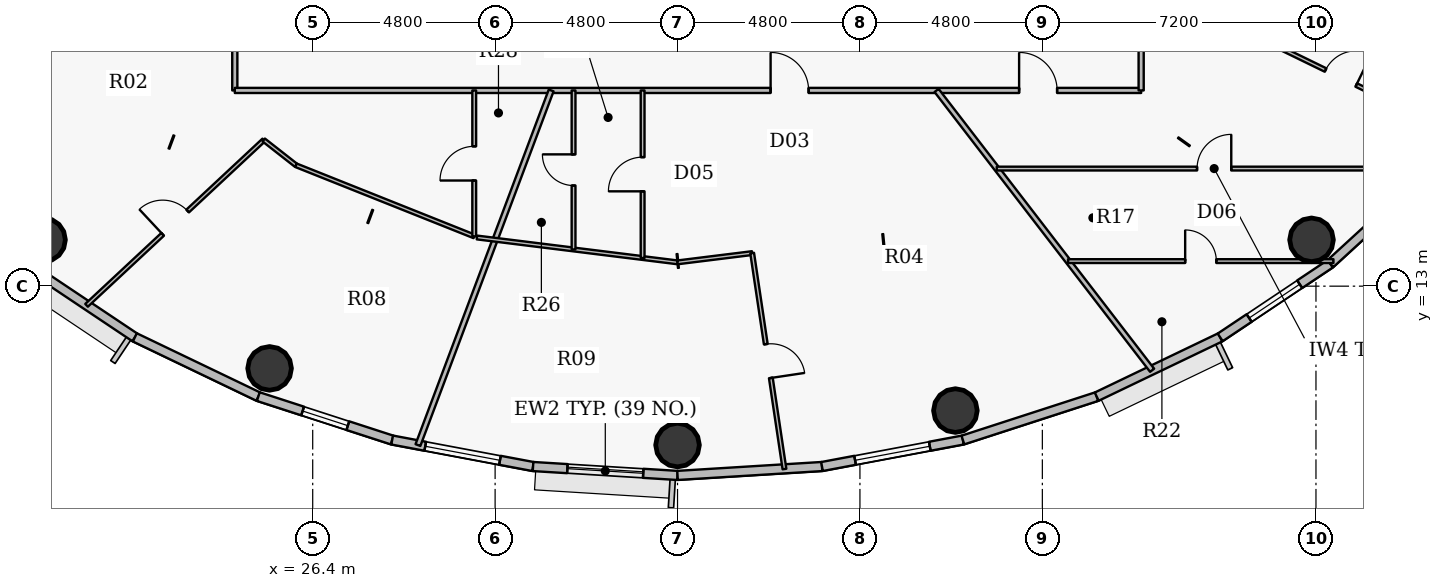
"""IFC4 building model, lengths in metres.
Left out: names, types, materials, properties, quantities, classifications, styles, units other than length and angle.
Written with IfcOpenShell. Run it as: python <this file> out.ifc"""

import sys

from ifc_helpers import new_model, si_unit, direction, frame, frame_2d, origin, origin_2d, place, context, subcontext, project, spatial, rectangle, hollow_circle, extrude, source, transform, mapped, element, fill, save


model = new_model("IFC4")
c1 = context("Model", 3, precision=1e-05, world=origin(), true_north=direction((0.0, 1.0)))
c2 = subcontext(c1, "Body", "Model", "MODEL_VIEW")
j1 = project(units=[si_unit("LENGTHUNIT", "METRE"), si_unit("PLANEANGLEUNIT", "RADIAN")], contexts=[c1])
p1 = place(None, origin())
s1 = spatial("IfcSite", under=j1, at=p1, CompositionType="ELEMENT")
p2 = place(p1, origin())
s2 = spatial("IfcBuilding", under=s1, at=p2, CompositionType="ELEMENT")
p3 = place(p2, frame((0.0, 0.0, 229.05)))
s3 = spatial("IfcBuildingStorey", under=s2, at=p3, CompositionType="ELEMENT", Elevation=229.05)
for number, where, z_axis, x_axis in (
    (1, (19.317, 14.219, 0.0), (0.0, 0.0, 1.0), (1.0, 0.0, 0.0)),
    (2, (25.265, 10.836, 0.0), (0.0, 0.0, 1.0), (1.0, 0.0, 0.0)),
    (3, (36.0, 8.82, 0.0), (0.0, 0.0, 1.0), (1.0, 0.0, 0.0)),
    (4, (43.312, 9.727, 0.0), (0.0, 0.0, 1.0), (1.0, 0.0, 0.0)),
    (5, (52.683, 14.219, 0.0), (0.0, 0.0, 1.0), (1.0, 0.0, 0.0)),
):
    element("IfcColumn", number, at=place(p3, frame(where, z_axis=z_axis, x_axis=x_axis)), inside=s3, PredefinedType="COLUMN", context=c2, shape_type="SweptSolid", body=[
        extrude(hollow_circle(Radius=0.575, WallThickness=0.036, at=origin_2d()), origin(), (0.0, 0.0, 1.0), 3.75),
    ])
p4 = place(p3, frame((21.72, 11.652, 0.0), z_axis=(0.0, 0.0, 1.0), x_axis=(-0.831262496074, 0.555880079352, 0.0)))
e6 = element("IfcWall", 6, at=p4, inside=s3, PredefinedType="SOLIDWALL", context=c2, shape_type="SweptSolid", body=[
    extrude(rectangle(XDim=3.484, YDim=0.24, at=frame_2d((1.742, 0.0))), origin(), (0.0, 0.0, 1.0), 3.5),
])
p5 = place(p3, frame((24.969, 10.094, 0.0), z_axis=(0.0, 0.0, 1.0), x_axis=(-0.901598104751, 0.432574684313, 0.0)))
e7 = element("IfcWall", 7, at=p5, inside=s3, PredefinedType="SOLIDWALL", context=c2, shape_type="SweptSolid", body=[
    extrude(rectangle(XDim=3.604, YDim=0.24, at=frame_2d((1.802, 0.0))), origin(), (0.0, 0.0, 1.0), 3.5),
])
p6 = place(p3, frame((28.491, 8.951, 0.0), z_axis=(0.0, 0.0, 1.0), x_axis=(-0.951210789182, 0.308541787354, 0.0)))
e8 = element("IfcWall", 8, at=p6, inside=s3, PredefinedType="SOLIDWALL", context=c2, shape_type="SweptSolid", body=[
    extrude(rectangle(XDim=3.702, YDim=0.24, at=frame_2d((1.851, 0.0))), origin(), (0.0, 0.0, 1.0), 3.5),
])
p7 = place(p6, frame((1.226, 0.0, 0.9)))
e9 = element("IfcOpeningElement", 9, at=p7, cuts=e8, PredefinedType="OPENING", context=c2, shape_type="SweptSolid", body=[
    extrude(rectangle(XDim=1.25, YDim=1.65, at=origin_2d()), frame((0.625, 0.13, 0.825), z_axis=(0.0, -1.0, 0.0), x_axis=(1.0, 0.0, 0.0)), (0.0, 0.0, 1.0), 0.26),
])
p8 = place(p3, frame((32.198, 8.254, 0.0), z_axis=(0.0, 0.0, 1.0), x_axis=(-0.982784898575, 0.184753465822, 0.0)))
e10 = element("IfcWall", 10, at=p8, inside=s3, PredefinedType="SOLIDWALL", context=c2, shape_type="SweptSolid", body=[
    extrude(rectangle(XDim=3.773, YDim=0.24, at=frame_2d((1.886, 0.0))), origin(), (0.0, 0.0, 1.0), 3.5),
])
p9 = place(p8, frame((0.886, 0.0, 0.9)))
e11 = element("IfcOpeningElement", 11, at=p9, cuts=e10, PredefinedType="OPENING", context=c2, shape_type="SweptSolid", body=[
    extrude(rectangle(XDim=2.0, YDim=1.75, at=origin_2d()), frame((1.0, 0.13, 0.875), z_axis=(0.0, -1.0, 0.0), x_axis=(1.0, 0.0, 0.0)), (0.0, 0.0, 1.0), 0.26),
])
p10 = place(p3, frame((36.0, 8.02, 0.0), z_axis=(0.0, 0.0, 1.0), x_axis=(-0.998108785312, 0.06147237333, 0.0)))
e12 = element("IfcWall", 12, at=p10, inside=s3, PredefinedType="SOLIDWALL", context=c2, shape_type="SweptSolid", body=[
    extrude(rectangle(XDim=3.809, YDim=0.24, at=frame_2d((1.904, 0.0))), origin(), (0.0, 0.0, 1.0), 3.5),
])
p11 = place(p10, frame((0.904, 0.0, 0.9)))
e13 = element("IfcOpeningElement", 13, at=p11, cuts=e12, PredefinedType="OPENING", context=c2, shape_type="SweptSolid", body=[
    extrude(rectangle(XDim=2.0, YDim=1.75, at=origin_2d()), frame((1.0, 0.13, 0.875), z_axis=(0.0, -1.0, 0.0), x_axis=(1.0, 0.0, 0.0)), (0.0, 0.0, 1.0), 0.26),
])
p12 = place(p3, frame((39.802, 8.254, 0.0), z_axis=(0.0, 0.0, 1.0), x_axis=(-0.998108785312, -0.06147237333, 0.0)))
e14 = element("IfcWall", 14, at=p12, inside=s3, PredefinedType="SOLIDWALL", context=c2, shape_type="SweptSolid", body=[
    extrude(rectangle(XDim=3.809, YDim=0.24, at=frame_2d((1.904, 0.0))), origin(), (0.0, 0.0, 1.0), 3.5),
])
p13 = place(p3, frame((43.509, 8.951, 0.0), z_axis=(0.0, 0.0, 1.0), x_axis=(-0.982784898575, -0.184753465822, 0.0)))
e15 = element("IfcWall", 15, at=p13, inside=s3, PredefinedType="SOLIDWALL", context=c2, shape_type="SweptSolid", body=[
    extrude(rectangle(XDim=3.773, YDim=0.24, at=frame_2d((1.886, 0.0))), origin(), (0.0, 0.0, 1.0), 3.5),
])
p14 = place(p13, frame((0.886, 0.0, 0.9)))
e16 = element("IfcOpeningElement", 16, at=p14, cuts=e15, PredefinedType="OPENING", context=c2, shape_type="SweptSolid", body=[
    extrude(rectangle(XDim=2.0, YDim=1.75, at=origin_2d()), frame((1.0, 0.13, 0.875), z_axis=(0.0, -1.0, 0.0), x_axis=(1.0, 0.0, 0.0)), (0.0, 0.0, 1.0), 0.26),
])
p15 = place(p3, frame((47.031, 10.094, 0.0), z_axis=(0.0, 0.0, 1.0), x_axis=(-0.951210789182, -0.308541787354, 0.0)))
e17 = element("IfcWall", 17, at=p15, inside=s3, PredefinedType="SOLIDWALL", context=c2, shape_type="SweptSolid", body=[
    extrude(rectangle(XDim=3.702, YDim=0.24, at=frame_2d((1.851, 0.0))), origin(), (0.0, 0.0, 1.0), 3.5),
])
p16 = place(p3, frame((50.28, 11.652, 0.0), z_axis=(0.0, 0.0, 1.0), x_axis=(-0.901598104751, -0.432574684313, 0.0)))
e18 = element("IfcWall", 18, at=p16, inside=s3, PredefinedType="SOLIDWALL", context=c2, shape_type="SweptSolid", body=[
    extrude(rectangle(XDim=3.604, YDim=0.24, at=frame_2d((1.802, 0.0))), origin(), (0.0, 0.0, 1.0), 3.5),
])
p17 = place(p3, frame((53.176, 13.589, 0.0), z_axis=(0.0, 0.0, 1.0), x_axis=(-0.831262496074, -0.555880079352, 0.0)))
e19 = element("IfcWall", 19, at=p17, inside=s3, PredefinedType="SOLIDWALL", context=c2, shape_type="SweptSolid", body=[
    extrude(rectangle(XDim=3.484, YDim=0.24, at=frame_2d((1.742, 0.0))), origin(), (0.0, 0.0, 1.0), 3.5),
])
p18 = place(p17, frame((0.968, 0.0, 0.9)))
e20 = element("IfcOpeningElement", 20, at=p18, cuts=e19, PredefinedType="OPENING", context=c2, shape_type="SweptSolid", body=[
    extrude(rectangle(XDim=1.6, YDim=1.75, at=origin_2d()), frame((0.8, 0.13, 0.875), z_axis=(0.0, -1.0, 0.0), x_axis=(1.0, 0.0, 0.0)), (0.0, 0.0, 1.0), 0.26),
])
p19 = place(p3, frame((55.648, 15.855, 0.0), z_axis=(0.0, 0.0, 1.0), x_axis=(-0.737123922599, -0.675757591694, 0.0)))
e21 = element("IfcWall", 21, at=p19, inside=s3, PredefinedType="SOLIDWALL", context=c2, shape_type="SweptSolid", body=[
    extrude(rectangle(XDim=3.354, YDim=0.24, at=frame_2d((1.677, 0.0))), origin(), (0.0, 0.0, 1.0), 3.5),
])
p20 = place(p3, frame((20.449, 12.496, 0.0), z_axis=(0.0, 0.0, 1.0), x_axis=(0.731298421662, 0.682057635743, 0.0)))
e22 = element("IfcWall", 22, at=p20, inside=s3, PredefinedType="PARTITIONING", context=c2, shape_type="SweptSolid", body=[
    extrude(rectangle(XDim=6.376, YDim=0.1, at=frame_2d((3.188, 0.0))), origin(), (0.0, 0.0, 1.0), 2.985),
])
p21 = place(p20, frame((2.738, 0.0, 0.0)))
e23 = element("IfcOpeningElement", 23, at=p21, cuts=e22, PredefinedType="OPENING", context=c2, shape_type="SweptSolid", body=[
    extrude(rectangle(XDim=0.9, YDim=2.1, at=origin_2d()), frame((0.45, 0.06, 1.05), z_axis=(0.0, -1.0, 0.0), x_axis=(1.0, 0.0, 0.0)), (0.0, 0.0, 1.0), 0.12),
])
p22 = place(p3, frame((24.35, 18.15, 0.0), z_axis=(0.0, 0.0, 1.0), x_axis=(0.0, 1.0, 0.0)))
e24 = element("IfcWall", 24, at=p22, inside=s3, PredefinedType="PARTITIONING", context=c2, shape_type="SweptSolid", body=[
    extrude(rectangle(XDim=7.9, YDim=0.135, at=frame_2d((3.95, 0.0))), origin(), (0.0, 0.0, 1.0), 2.935),
])
p23 = place(p22, frame((3.45, 0.0, 0.0)))
e25 = element("IfcOpeningElement", 25, at=p23, cuts=e24, PredefinedType="OPENING", context=c2, shape_type="SweptSolid", body=[
    extrude(rectangle(XDim=1.0, YDim=2.15, at=origin_2d()), frame((0.5, 0.078, 1.075), z_axis=(0.0, -1.0, 0.0), x_axis=(1.0, 0.0, 0.0)), (0.0, 0.0, 1.0), 0.155),
])
p24 = place(p3, frame((24.35, 18.15, 0.0), z_axis=(0.0, 0.0, 1.0), x_axis=(1.0, 0.0, 0.0)))
e26 = element("IfcWall", 26, at=p24, inside=s3, PredefinedType="PARTITIONING", context=c2, shape_type="SweptSolid", body=[
    extrude(rectangle(XDim=23.85, YDim=0.135, at=frame_2d((11.925, 0.0))), origin(), (0.0, 0.0, 1.0), 2.935),
])
p25 = place(p24, frame((14.099, 0.0, 0.0)))
e27 = element("IfcOpeningElement", 27, at=p25, cuts=e26, PredefinedType="OPENING", context=c2, shape_type="SweptSolid", body=[
    extrude(rectangle(XDim=1.0, YDim=2.15, at=origin_2d()), frame((0.5, 0.078, 1.075), z_axis=(0.0, -1.0, 0.0), x_axis=(1.0, 0.0, 0.0)), (0.0, 0.0, 1.0), 0.155),
])
p26 = place(p24, frame((20.638, 0.0, 0.0)))
e28 = element("IfcOpeningElement", 28, at=p26, cuts=e26, PredefinedType="OPENING", context=c2, shape_type="SweptSolid", body=[
    extrude(rectangle(XDim=1.0, YDim=2.15, at=origin_2d()), frame((0.5, 0.078, 1.075), z_axis=(0.0, -1.0, 0.0), x_axis=(1.0, 0.0, 0.0)), (0.0, 0.0, 1.0), 0.155),
])
p27 = place(p3, frame((25.112, 16.845, 0.0), z_axis=(0.0, 0.0, 1.0), x_axis=(0.787433290794, -0.616399880394, 0.0)))
e29 = element("IfcWall", 29, at=p27, inside=s3, PredefinedType="PARTITIONING", context=c2, shape_type="SweptSolid", body=[
    extrude(rectangle(XDim=1.078, YDim=0.1, at=frame_2d((0.539, 0.0))), origin(), (0.0, 0.0, 1.0), 3.5),
])
p28 = place(p3, frame((25.961, 16.181, 0.0), z_axis=(0.0, 0.0, 1.0), x_axis=(0.928803127631, -0.370573542098, 0.0)))
e30 = element("IfcWall", 30, at=p28, inside=s3, PredefinedType="PARTITIONING", context=c2, shape_type="SweptSolid", body=[
    extrude(rectangle(XDim=5.049, YDim=0.1, at=frame_2d((2.524, 0.0))), origin(), (0.0, 0.0, 1.0), 2.935),
])
p29 = place(p3, frame((29.169, 8.819, 0.0), z_axis=(0.0, 0.0, 1.0), x_axis=(0.351676288836, 0.936121673646, 0.0)))
e31 = element("IfcWall", 31, at=p29, inside=s3, PredefinedType="PARTITIONING", context=c2, shape_type="SweptSolid", body=[
    extrude(rectangle(XDim=9.968, YDim=0.135, at=frame_2d((4.984, 0.0))), origin(), (0.0, 0.0, 1.0), 2.985),
])
p30 = place(p3, frame((30.65, 14.31, 0.0), z_axis=(0.0, 0.0, 1.0), x_axis=(0.0, 1.0, 0.0)))
e32 = element("IfcWall", 32, at=p30, inside=s3, PredefinedType="PARTITIONING", context=c2, shape_type="SweptSolid", body=[
    extrude(rectangle(XDim=3.84, YDim=0.1, at=frame_2d((1.92, 0.0))), origin(), (0.0, 0.0, 1.0), 3.5),
])
p31 = place(p30, frame((1.47, 0.0, 0.0)))
e33 = element("IfcOpeningElement", 33, at=p31, cuts=e32, PredefinedType="OPENING", context=c2, shape_type="SweptSolid", body=[
    extrude(rectangle(XDim=0.9, YDim=2.1, at=origin_2d()), frame((0.45, 0.06, 1.05), z_axis=(0.0, -1.0, 0.0), x_axis=(1.0, 0.0, 0.0)), (0.0, 0.0, 1.0), 0.12),
])
p32 = place(p3, frame((30.722, 14.281, 0.0), z_axis=(0.0, 0.0, 1.0), x_axis=(0.992398169186, -0.123068573551, 0.0)))
e34 = element("IfcWall", 34, at=p32, inside=s3, PredefinedType="PARTITIONING", context=c2, shape_type="SweptSolid", body=[
    extrude(rectangle(XDim=5.319, YDim=0.1, at=frame_2d((2.659, 0.0))), origin(), (0.0, 0.0, 1.0), 2.935),
])
p33 = place(p3, frame((33.264, 13.966, 0.0), z_axis=(0.0, 0.0, 1.0), x_axis=(0.0, 1.0, 0.0)))
e35 = element("IfcWall", 35, at=p33, inside=s3, PredefinedType="PARTITIONING", context=c2, shape_type="SweptSolid", body=[
    extrude(rectangle(XDim=4.184, YDim=0.1, at=frame_2d((2.092, 0.0))), origin(), (0.0, 0.0, 1.0), 3.5),
])
p34 = place(p33, frame((1.682, 0.0, 0.0)))
e36 = element("IfcOpeningElement", 36, at=p34, cuts=e35, PredefinedType="OPENING", context=c2, shape_type="SweptSolid", body=[
    extrude(rectangle(XDim=0.82, YDim=2.1, at=origin_2d()), frame((0.41, 0.06, 1.05), z_axis=(0.0, -1.0, 0.0), x_axis=(1.0, 0.0, 0.0)), (0.0, 0.0, 1.0), 0.12),
])
p35 = place(p3, frame((35.082, 13.74, 0.0), z_axis=(0.0, 0.0, 1.0), x_axis=(0.0, 1.0, 0.0)))
e37 = element("IfcWall", 37, at=p35, inside=s3, PredefinedType="PARTITIONING", context=c2, shape_type="SweptSolid", body=[
    extrude(rectangle(XDim=4.409, YDim=0.1, at=frame_2d((2.205, 0.0))), origin(), (0.0, 0.0, 1.0), 3.5),
])
p36 = place(p35, frame((1.755, 0.0, 0.0)))
e38 = element("IfcOpeningElement", 38, at=p36, cuts=e37, PredefinedType="OPENING", context=c2, shape_type="SweptSolid", body=[
    extrude(rectangle(XDim=0.9, YDim=2.1, at=origin_2d()), frame((0.45, 0.06, 1.05), z_axis=(0.0, -1.0, 0.0), x_axis=(1.0, 0.0, 0.0)), (0.0, 0.0, 1.0), 0.12),
])
p37 = place(p3, frame((36.0, 13.626, 0.0), z_axis=(0.0, 0.0, 1.0), x_axis=(0.992393208717, 0.123108567097, 0.0)))
e39 = element("IfcWall", 39, at=p37, inside=s3, PredefinedType="PARTITIONING", context=c2, shape_type="SweptSolid", body=[
    extrude(rectangle(XDim=1.979, YDim=0.1, at=frame_2d((0.99, 0.0))), origin(), (0.0, 0.0, 1.0), 2.935),
])
p38 = place(p3, frame((37.964, 13.87, 0.0), z_axis=(0.0, 0.0, 1.0), x_axis=(0.147933131181, -0.988997365365, 0.0)))
e40 = element("IfcWall", 40, at=p38, inside=s3, PredefinedType="PARTITIONING", context=c2, shape_type="SweptSolid", body=[
    extrude(rectangle(XDim=5.745, YDim=0.1, at=frame_2d((2.873, 0.0))), origin(), (0.0, 0.0, 1.0), 2.985),
])
p39 = place(p38, frame((2.422, 0.0, 0.0)))
e41 = element("IfcOpeningElement", 41, at=p39, cuts=e40, PredefinedType="OPENING", context=c2, shape_type="SweptSolid", body=[
    extrude(rectangle(XDim=0.9, YDim=2.1, at=origin_2d()), frame((0.45, 0.06, 1.05), z_axis=(0.0, -1.0, 0.0), x_axis=(1.0, 0.0, 0.0)), (0.0, 0.0, 1.0), 0.12),
])
p40 = place(p3, frame((42.817, 18.15, 0.0), z_axis=(0.0, 0.0, 1.0), x_axis=(0.610231128601, -0.792223434194, 0.0)))
e42 = element("IfcWall", 42, at=p40, inside=s3, PredefinedType="PARTITIONING", context=c2, shape_type="SweptSolid", body=[
    extrude(rectangle(XDim=9.294, YDim=0.135, at=frame_2d((4.647, 0.0))), origin(), (0.0, 0.0, 1.0), 2.985),
])
p41 = place(p3, frame((44.401, 16.094, 0.0), z_axis=(0.0, 0.0, 1.0), x_axis=(1.0, 0.0, 0.0)))
e43 = element("IfcWall", 43, at=p41, inside=s3, PredefinedType="PARTITIONING", context=c2, shape_type="SweptSolid", body=[
    extrude(rectangle(XDim=11.441, YDim=0.1, at=frame_2d((5.72, 0.0))), origin(), (0.0, 0.0, 1.0), 2.935),
])
p42 = place(p41, frame((5.271, 0.0, 0.0)))
e44 = element("IfcOpeningElement", 44, at=p42, cuts=e43, PredefinedType="OPENING", context=c2, shape_type="SweptSolid", body=[
    extrude(rectangle(XDim=0.9, YDim=2.1, at=origin_2d()), frame((0.45, 0.06, 1.05), z_axis=(0.0, -1.0, 0.0), x_axis=(1.0, 0.0, 0.0)), (0.0, 0.0, 1.0), 0.12),
])
p43 = place(p3, frame((46.276, 13.659, 0.0), z_axis=(0.0, 0.0, 1.0), x_axis=(1.0, 0.0, 0.0)))
e45 = element("IfcWall", 45, at=p43, inside=s3, PredefinedType="PARTITIONING", context=c2, shape_type="SweptSolid", body=[
    extrude(rectangle(XDim=6.984, YDim=0.1, at=frame_2d((3.492, 0.0))), origin(), (0.0, 0.0, 1.0), 2.985),
])
p44 = place(p43, frame((3.082, 0.0, 0.0)))
e46 = element("IfcOpeningElement", 46, at=p44, cuts=e45, PredefinedType="OPENING", context=c2, shape_type="SweptSolid", body=[
    extrude(rectangle(XDim=0.82, YDim=2.1, at=origin_2d()), frame((0.41, 0.06, 1.05), z_axis=(0.0, -1.0, 0.0), x_axis=(1.0, 0.0, 0.0)), (0.0, 0.0, 1.0), 0.12),
])
p45 = place(p3, frame((48.2, 18.15, 0.0), z_axis=(0.0, 0.0, 1.0), x_axis=(0.0, 1.0, 0.0)))
e47 = element("IfcWall", 47, at=p45, inside=s3, PredefinedType="PARTITIONING", context=c2, shape_type="SweptSolid", body=[
    extrude(rectangle(XDim=1.9, YDim=0.135, at=frame_2d((0.95, 0.0))), origin(), (0.0, 0.0, 1.0), 3.5),
])
p46 = place(p3, frame((50.374, 19.993, 0.0), z_axis=(0.0, 0.0, 1.0), x_axis=(0.898866241562, -0.438223093618, 0.0)))
e48 = element("IfcWall", 48, at=p46, inside=s3, PredefinedType="PARTITIONING", context=c2, shape_type="SweptSolid", body=[
    extrude(rectangle(XDim=6.86, YDim=0.1, at=frame_2d((3.43, 0.0))), origin(), (0.0, 0.0, 1.0), 2.985),
])
p47 = place(p46, frame((2.98, 0.0, 0.0)))
e49 = element("IfcOpeningElement", 49, at=p47, cuts=e48, PredefinedType="OPENING", context=c2, shape_type="SweptSolid", body=[
    extrude(rectangle(XDim=0.9, YDim=2.1, at=origin_2d()), frame((0.45, 0.06, 1.05), z_axis=(0.0, -1.0, 0.0), x_axis=(1.0, 0.0, 0.0)), (0.0, 0.0, 1.0), 0.12),
])
m1 = source(origin(), c2, "Body", "SweptSolid", [
    extrude(rectangle(XDim=2.0, YDim=1.75, at=origin_2d()), frame((1.0, 0.03, 0.875), z_axis=(0.0, -1.0, 0.0), x_axis=(1.0, 0.0, 0.0)), (0.0, 0.0, 1.0), 0.06),
])
p48 = place(p9, origin())
e50 = element("IfcWindow", 50, at=p48, inside=s3, PartitioningType="DOUBLE_PANEL_VERTICAL", PredefinedType="WINDOW", context=c2, shape_type="MappedRepresentation", body=[
    mapped(m1, transform((0.0, 0.0, 0.0), x_axis=(1.0, 0.0, 0.0), y_axis=(0.0, 1.0, 0.0), z_axis=(0.0, 0.0, 1.0), scale=1.0)),
])
fill(e11, e50)
p49 = place(p11, origin())
e51 = element("IfcWindow", 51, at=p49, inside=s3, PartitioningType="DOUBLE_PANEL_VERTICAL", PredefinedType="WINDOW", context=c2, shape_type="MappedRepresentation", body=[
    mapped(m1, transform((0.0, 0.0, 0.0), x_axis=(1.0, 0.0, 0.0), y_axis=(0.0, 1.0, 0.0), z_axis=(0.0, 0.0, 1.0), scale=1.0)),
])
fill(e13, e51)
p50 = place(p14, origin())
e52 = element("IfcWindow", 52, at=p50, inside=s3, PartitioningType="DOUBLE_PANEL_VERTICAL", PredefinedType="WINDOW", context=c2, shape_type="MappedRepresentation", body=[
    mapped(m1, transform((0.0, 0.0, 0.0), x_axis=(1.0, 0.0, 0.0), y_axis=(0.0, 1.0, 0.0), z_axis=(0.0, 0.0, 1.0), scale=1.0)),
])
fill(e16, e52)
m2 = source(origin(), c2, "Body", "SweptSolid", [
    extrude(rectangle(XDim=1.6, YDim=1.75, at=origin_2d()), frame((0.8, 0.03, 0.875), z_axis=(0.0, -1.0, 0.0), x_axis=(1.0, 0.0, 0.0)), (0.0, 0.0, 1.0), 0.06),
])
p51 = place(p18, origin())
e53 = element("IfcWindow", 53, at=p51, inside=s3, PartitioningType="DOUBLE_PANEL_VERTICAL", PredefinedType="WINDOW", context=c2, shape_type="MappedRepresentation", body=[
    mapped(m2, transform((0.0, 0.0, 0.0), x_axis=(1.0, 0.0, 0.0), y_axis=(0.0, 1.0, 0.0), z_axis=(0.0, 0.0, 1.0), scale=1.0)),
])
fill(e20, e53)
m3 = source(origin(), c2, "Body", "SweptSolid", [
    extrude(rectangle(XDim=1.25, YDim=1.65, at=origin_2d()), frame((0.625, 0.03, 0.825), z_axis=(0.0, -1.0, 0.0), x_axis=(1.0, 0.0, 0.0)), (0.0, 0.0, 1.0), 0.06),
])
p52 = place(p7, origin())
e54 = element("IfcWindow", 54, at=p52, inside=s3, PartitioningType="SINGLE_PANEL", PredefinedType="WINDOW", context=c2, shape_type="MappedRepresentation", body=[
    mapped(m3, transform((0.0, 0.0, 0.0), x_axis=(1.0, 0.0, 0.0), y_axis=(0.0, 1.0, 0.0), z_axis=(0.0, 0.0, 1.0), scale=1.0)),
])
fill(e9, e54)
m4 = source(origin(), c2, "Body", "SweptSolid", [
    extrude(rectangle(XDim=0.9, YDim=2.1, at=origin_2d()), frame((0.45, 0.025, 1.05), z_axis=(0.0, -1.0, 0.0), x_axis=(1.0, 0.0, 0.0)), (0.0, 0.0, 1.0), 0.05),
])
p53 = place(p21, origin())
e55 = element("IfcDoor", 55, at=p53, inside=s3, OperationType="SINGLE_SWING_LEFT", PredefinedType="DOOR", context=c2, shape_type="MappedRepresentation", body=[
    mapped(m4, transform((0.0, 0.0, 0.0), x_axis=(1.0, 0.0, 0.0), y_axis=(0.0, 1.0, 0.0), z_axis=(0.0, 0.0, 1.0), scale=1.0)),
])
fill(e23, e55)
p54 = place(p31, origin())
e56 = element("IfcDoor", 56, at=p54, inside=s3, OperationType="SINGLE_SWING_LEFT", PredefinedType="DOOR", context=c2, shape_type="MappedRepresentation", body=[
    mapped(m4, transform((0.0, 0.0, 0.0), x_axis=(1.0, 0.0, 0.0), y_axis=(0.0, 1.0, 0.0), z_axis=(0.0, 0.0, 1.0), scale=1.0)),
])
fill(e33, e56)
m5 = source(origin(), c2, "Body", "SweptSolid", [
    extrude(rectangle(XDim=1.0, YDim=2.15, at=origin_2d()), frame((0.5, 0.025, 1.075), z_axis=(0.0, -1.0, 0.0), x_axis=(1.0, 0.0, 0.0)), (0.0, 0.0, 1.0), 0.05),
])
p55 = place(p25, origin())
e57 = element("IfcDoor", 57, at=p55, inside=s3, OperationType="SINGLE_SWING_LEFT", PredefinedType="DOOR", context=c2, shape_type="MappedRepresentation", body=[
    mapped(m5, transform((0.0, 0.0, 0.0), x_axis=(1.0, 0.0, 0.0), y_axis=(0.0, 1.0, 0.0), z_axis=(0.0, 0.0, 1.0), scale=1.0)),
])
fill(e27, e57)
p56 = place(p39, origin())
e58 = element("IfcDoor", 58, at=p56, inside=s3, OperationType="SINGLE_SWING_RIGHT", PredefinedType="DOOR", context=c2, shape_type="MappedRepresentation", body=[
    mapped(m4, transform((0.0, 0.0, 0.0), x_axis=(1.0, 0.0, 0.0), y_axis=(0.0, 1.0, 0.0), z_axis=(0.0, 0.0, 1.0), scale=1.0)),
])
fill(e41, e58)
p57 = place(p36, origin())
e59 = element("IfcDoor", 59, at=p57, inside=s3, OperationType="SINGLE_SWING_LEFT", PredefinedType="DOOR", context=c2, shape_type="MappedRepresentation", body=[
    mapped(m4, transform((0.0, 0.0, 0.0), x_axis=(1.0, 0.0, 0.0), y_axis=(0.0, 1.0, 0.0), z_axis=(0.0, 0.0, 1.0), scale=1.0)),
])
fill(e38, e59)
m6 = source(origin(), c2, "Body", "SweptSolid", [
    extrude(rectangle(XDim=0.82, YDim=2.1, at=origin_2d()), frame((0.41, 0.025, 1.05), z_axis=(0.0, -1.0, 0.0), x_axis=(1.0, 0.0, 0.0)), (0.0, 0.0, 1.0), 0.05),
])
p58 = place(p34, origin())
e60 = element("IfcDoor", 60, at=p58, inside=s3, OperationType="SINGLE_SWING_RIGHT", PredefinedType="DOOR", context=c2, shape_type="MappedRepresentation", body=[
    mapped(m6, transform((0.0, 0.0, 0.0), x_axis=(1.0, 0.0, 0.0), y_axis=(0.0, 1.0, 0.0), z_axis=(0.0, 0.0, 1.0), scale=1.0)),
])
fill(e36, e60)
p59 = place(p26, origin())
e61 = element("IfcDoor", 61, at=p59, inside=s3, OperationType="SINGLE_SWING_LEFT", PredefinedType="DOOR", context=c2, shape_type="MappedRepresentation", body=[
    mapped(m5, transform((0.0, 0.0, 0.0), x_axis=(1.0, 0.0, 0.0), y_axis=(0.0, 1.0, 0.0), z_axis=(0.0, 0.0, 1.0), scale=1.0)),
])
fill(e28, e61)
p60 = place(p47, origin())
e62 = element("IfcDoor", 62, at=p60, inside=s3, OperationType="SINGLE_SWING_RIGHT", PredefinedType="DOOR", context=c2, shape_type="MappedRepresentation", body=[
    mapped(m4, transform((0.0, 0.0, 0.0), x_axis=(1.0, 0.0, 0.0), y_axis=(0.0, 1.0, 0.0), z_axis=(0.0, 0.0, 1.0), scale=1.0)),
])
fill(e49, e62)
p61 = place(p42, origin())
e63 = element("IfcDoor", 63, at=p61, inside=s3, OperationType="SINGLE_SWING_RIGHT", PredefinedType="DOOR", context=c2, shape_type="MappedRepresentation", body=[
    mapped(m4, transform((0.0, 0.0, 0.0), x_axis=(1.0, 0.0, 0.0), y_axis=(0.0, 1.0, 0.0), z_axis=(0.0, 0.0, 1.0), scale=1.0)),
])
fill(e44, e63)
p62 = place(p44, origin())
e64 = element("IfcDoor", 64, at=p62, inside=s3, OperationType="SINGLE_SWING_LEFT", PredefinedType="DOOR", context=c2, shape_type="MappedRepresentation", body=[
    mapped(m6, transform((0.0, 0.0, 0.0), x_axis=(1.0, 0.0, 0.0), y_axis=(0.0, 1.0, 0.0), z_axis=(0.0, 0.0, 1.0), scale=1.0)),
])
fill(e46, e64)
save(model, sys.argv[1])
